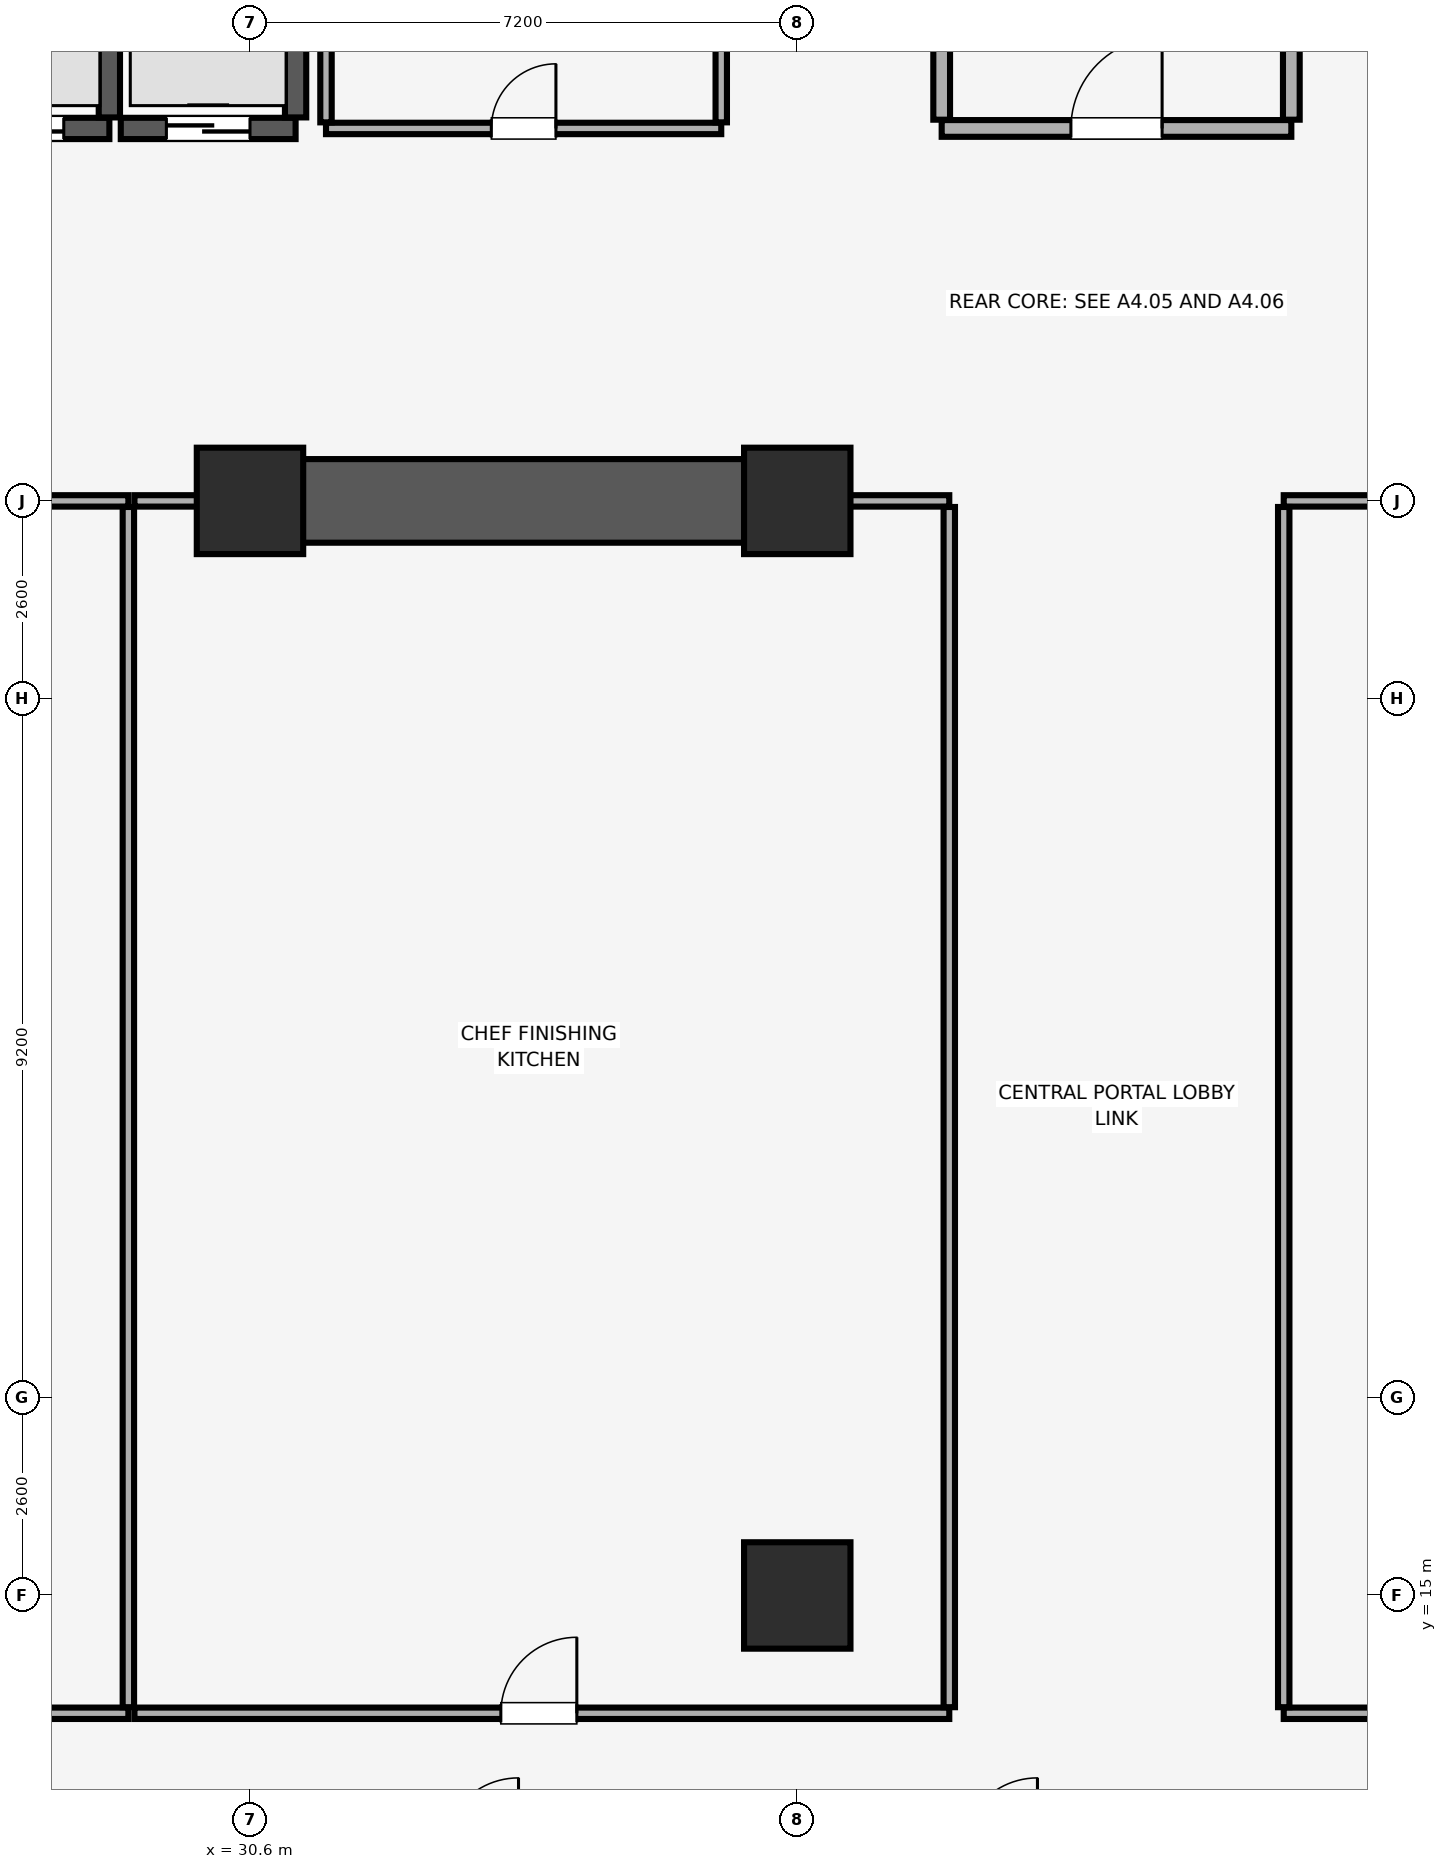
"""IFC4 building model, lengths in metres.
Left out: names, types, materials, properties, quantities, classifications, styles, units other than length and angle.
Written with IfcOpenShell. Run it as: python <this file> out.ifc"""

import sys

from ifc_helpers import new_model, si_unit, direction, frame, frame_2d, origin, origin_2d, place, context, subcontext, project, spatial, rectangle, extrude, element, fill, save


model = new_model("IFC4")
c1 = context("Model", 3, precision=1e-05, world=origin(), true_north=direction((0.0, 1.0)))
c2 = subcontext(c1, "Body", "Model", "MODEL_VIEW")
j1 = project(units=[si_unit("LENGTHUNIT", "METRE"), si_unit("PLANEANGLEUNIT", "RADIAN")], contexts=[c1])
p1 = place(None, origin())
s1 = spatial("IfcSite", under=j1, at=p1, CompositionType="ELEMENT")
p2 = place(p1, origin())
s2 = spatial("IfcBuilding", under=s1, at=p2, CompositionType="ELEMENT")
p3 = place(p2, frame((0.0, 0.0, 57.65)))
s3 = spatial("IfcBuildingStorey", under=s2, at=p3, CompositionType="ELEMENT", Elevation=57.65)
for number, where, z_axis, x_axis in (
    (1, (37.8, 15.0, 0.0), (0.0, 0.0, 1.0), (1.0, 0.0, 0.0)),
    (2, (30.6, 29.4, 0.0), (0.0, 0.0, 1.0), (1.0, 0.0, 0.0)),
    (3, (37.8, 29.4, 0.0), (0.0, 0.0, 1.0), (1.0, 0.0, 0.0)),
):
    element("IfcColumn", number, at=place(p3, frame(where, z_axis=z_axis, x_axis=x_axis)), inside=s3, PredefinedType="COLUMN", context=c2, shape_type="SweptSolid", body=[
        extrude(rectangle(XDim=1.4, YDim=1.4, at=origin_2d()), origin(), (0.0, 0.0, 1.0), 3.51),
    ])
p4 = place(p3, frame((30.4, 29.4, 0.0), z_axis=(0.0, 0.0, 1.0), x_axis=(1.0, 0.0, 0.0)))
e4 = element("IfcWall", 4, at=p4, inside=s3, PredefinedType="SHEAR", context=c2, shape_type="SweptSolid", body=[
    extrude(rectangle(XDim=7.6, YDim=1.1, at=frame_2d((3.8, 0.0))), origin(), (0.0, 0.0, 1.0), 3.51),
])
p5 = place(p3, frame((26.45, 34.3, 0.0), z_axis=(0.0, 0.0, 1.0), x_axis=(1.0, 0.0, 0.0)))
e5 = element("IfcWall", 5, at=p5, inside=s3, PredefinedType="SHEAR", context=c2, shape_type="SweptSolid", body=[
    extrude(rectangle(XDim=2.3, YDim=0.28, at=frame_2d((1.15, 0.0))), origin(), (0.0, 0.0, 1.0), 3.51),
])
p6 = place(p5, frame((0.6, 0.0, 0.0)))
e6 = element("IfcOpeningElement", 6, at=p6, cuts=e5, PredefinedType="OPENING", context=c2, shape_type="SweptSolid", body=[
    extrude(rectangle(XDim=1.1, YDim=2.2, at=frame_2d((0.55, 1.1))), frame((0.0, 0.15, 0.0), z_axis=(0.0, -1.0, 0.0), x_axis=(1.0, 0.0, 0.0)), (0.0, 0.0, 1.0), 0.3),
])
p7 = place(p3, frame((28.75, 34.445, 0.0), z_axis=(0.0, 0.0, 1.0), x_axis=(0.0, 1.0, 0.0)))
e7 = element("IfcWall", 7, at=p7, inside=s3, PredefinedType="SHEAR", context=c2, shape_type="SweptSolid", body=[
    extrude(rectangle(XDim=2.01, YDim=0.28, at=frame_2d((1.005, 0.0))), origin(), (0.0, 0.0, 1.0), 3.51),
])
p8 = place(p3, frame((28.9, 34.3, 0.0), z_axis=(0.0, 0.0, 1.0), x_axis=(1.0, 0.0, 0.0)))
e8 = element("IfcWall", 8, at=p8, inside=s3, PredefinedType="SHEAR", context=c2, shape_type="SweptSolid", body=[
    extrude(rectangle(XDim=2.3, YDim=0.28, at=frame_2d((1.15, 0.0))), origin(), (0.0, 0.0, 1.0), 3.51),
])
p9 = place(p8, frame((0.6, 0.0, 0.0)))
e9 = element("IfcOpeningElement", 9, at=p9, cuts=e8, PredefinedType="OPENING", context=c2, shape_type="SweptSolid", body=[
    extrude(rectangle(XDim=1.1, YDim=2.2, at=frame_2d((0.55, 1.1))), frame((0.0, 0.15, 0.0), z_axis=(0.0, -1.0, 0.0), x_axis=(1.0, 0.0, 0.0)), (0.0, 0.0, 1.0), 0.3),
])
p10 = place(p3, frame((31.2, 34.445, 0.0), z_axis=(0.0, 0.0, 1.0), x_axis=(0.0, 1.0, 0.0)))
e10 = element("IfcWall", 10, at=p10, inside=s3, PredefinedType="SHEAR", context=c2, shape_type="SweptSolid", body=[
    extrude(rectangle(XDim=2.01, YDim=0.28, at=frame_2d((1.005, 0.0))), origin(), (0.0, 0.0, 1.0), 3.51),
])
p11 = place(p3, frame((39.7, 34.3, 0.0), z_axis=(0.0, 0.0, 1.0), x_axis=(1.0, 0.0, 0.0)))
e11 = element("IfcWall", 11, at=p11, inside=s3, PredefinedType="PARTITIONING", context=c2, shape_type="SweptSolid", body=[
    extrude(rectangle(XDim=4.6, YDim=0.22, at=frame_2d((2.3, 0.0))), origin(), (0.0, 0.0, 1.0), 3.51),
])
p12 = place(p11, frame((1.7, 0.0, 0.0)))
e12 = element("IfcOpeningElement", 12, at=p12, cuts=e11, PredefinedType="OPENING", context=c2, shape_type="SweptSolid", body=[
    extrude(rectangle(XDim=1.2, YDim=2.15, at=frame_2d((0.6, 1.075))), frame((0.0, 0.12, 0.0), z_axis=(0.0, -1.0, 0.0), x_axis=(1.0, 0.0, 0.0)), (0.0, 0.0, 1.0), 0.24),
])
for number, where, z_axis, x_axis in (
    (13, (39.7, 34.415, 0.0), (0.0, 0.0, 1.0), (0.0, 1.0, 0.0)),
    (14, (44.3, 34.415, 0.0), (0.0, 0.0, 1.0), (0.0, 1.0, 0.0)),
):
    element("IfcWall", number, at=place(p3, frame(where, z_axis=z_axis, x_axis=x_axis)), inside=s3, PredefinedType="PARTITIONING", context=c2, shape_type="SweptSolid", body=[
        extrude(rectangle(XDim=5.785, YDim=0.22, at=frame_2d((2.893, 0.0))), origin(), (0.0, 0.0, 1.0), 3.51),
    ])
p13 = place(p3, frame((31.6, 34.3, 0.0), z_axis=(0.0, 0.0, 1.0), x_axis=(1.0, 0.0, 0.0)))
e15 = element("IfcWall", 15, at=p13, inside=s3, PredefinedType="PARTITIONING", context=c2, shape_type="SweptSolid", body=[
    extrude(rectangle(XDim=5.2, YDim=0.15, at=frame_2d((2.6, 0.0))), origin(), (0.0, 0.0, 1.0), 3.51),
])
p14 = place(p13, frame((2.175, 0.0, 0.0)))
e16 = element("IfcOpeningElement", 16, at=p14, cuts=e15, PredefinedType="OPENING", context=c2, shape_type="SweptSolid", body=[
    extrude(rectangle(XDim=0.85, YDim=2.1, at=frame_2d((0.425, 1.05))), frame((0.0, 0.085, 0.0), z_axis=(0.0, -1.0, 0.0), x_axis=(1.0, 0.0, 0.0)), (0.0, 0.0, 1.0), 0.17),
])
for number, where, z_axis, x_axis in (
    (17, (31.6, 34.38, 0.0), (0.0, 0.0, 1.0), (0.0, 1.0, 0.0)),
    (18, (36.8, 34.38, 0.0), (0.0, 0.0, 1.0), (0.0, 1.0, 0.0)),
):
    element("IfcWall", number, at=place(p3, frame(where, z_axis=z_axis, x_axis=x_axis)), inside=s3, PredefinedType="PARTITIONING", context=c2, shape_type="SweptSolid", body=[
        extrude(rectangle(XDim=4.94, YDim=0.15, at=frame_2d((2.47, 0.0))), origin(), (0.0, 0.0, 1.0), 3.51),
    ])
p15 = place(p3, frame((15.8, 13.45, 0.0), z_axis=(0.0, 0.0, 1.0), x_axis=(1.0, 0.0, 0.0)))
e19 = element("IfcWall", 19, at=p15, inside=s3, PredefinedType="PARTITIONING", context=c2, shape_type="SweptSolid", body=[
    extrude(rectangle(XDim=13.2, YDim=0.15, at=frame_2d((6.6, 0.0))), origin(), (0.0, 0.0, 1.0), 3.51),
])
p16 = place(p15, frame((5.35, 0.0, 0.0)))
e20 = element("IfcOpeningElement", 20, at=p16, cuts=e19, PredefinedType="OPENING", context=c2, shape_type="SweptSolid", body=[
    extrude(rectangle(XDim=1.5, YDim=2.25, at=frame_2d((0.75, 1.125))), frame((0.0, 0.085, 0.0), z_axis=(0.0, -1.0, 0.0), x_axis=(1.0, 0.0, 0.0)), (0.0, 0.0, 1.0), 0.17),
])
p17 = place(p3, frame((23.61, 29.4, 0.0), z_axis=(0.0, 0.0, 1.0), x_axis=(1.0, 0.0, 0.0)))
e21 = element("IfcWall", 21, at=p17, inside=s3, PredefinedType="PARTITIONING", context=c2, shape_type="SweptSolid", body=[
    extrude(rectangle(XDim=5.39, YDim=0.15, at=frame_2d((2.695, 0.0))), origin(), (0.0, 0.0, 1.0), 2.41),
])
p18 = place(p3, frame((29.0, 13.53, 0.0), z_axis=(0.0, 0.0, 1.0), x_axis=(0.0, 1.0, 0.0)))
e22 = element("IfcWall", 22, at=p18, inside=s3, PredefinedType="PARTITIONING", context=c2, shape_type="SweptSolid", body=[
    extrude(rectangle(XDim=15.79, YDim=0.15, at=frame_2d((7.895, 0.0))), origin(), (0.0, 0.0, 1.0), 3.51),
])
p19 = place(p3, frame((29.08, 13.45, 0.0), z_axis=(0.0, 0.0, 1.0), x_axis=(1.0, 0.0, 0.0)))
e23 = element("IfcWall", 23, at=p19, inside=s3, PredefinedType="PARTITIONING", context=c2, shape_type="SweptSolid", body=[
    extrude(rectangle(XDim=10.72, YDim=0.15, at=frame_2d((5.36, 0.0))), origin(), (0.0, 0.0, 1.0), 3.51),
])
p20 = place(p19, frame((4.82, 0.0, 0.0)))
e24 = element("IfcOpeningElement", 24, at=p20, cuts=e23, PredefinedType="OPENING", context=c2, shape_type="SweptSolid", body=[
    extrude(rectangle(XDim=1.0, YDim=2.15, at=frame_2d((0.5, 1.075))), frame((0.0, 0.085, 0.0), z_axis=(0.0, -1.0, 0.0), x_axis=(1.0, 0.0, 0.0)), (0.0, 0.0, 1.0), 0.17),
])
p21 = place(p3, frame((29.08, 29.4, 0.0), z_axis=(0.0, 0.0, 1.0), x_axis=(1.0, 0.0, 0.0)))
e25 = element("IfcWall", 25, at=p21, inside=s3, PredefinedType="PARTITIONING", context=c2, shape_type="SweptSolid", body=[
    extrude(rectangle(XDim=1.31, YDim=0.15, at=frame_2d((0.655, 0.0))), origin(), (0.0, 0.0, 1.0), 2.41),
])
p22 = place(p3, frame((38.01, 29.4, 0.0), z_axis=(0.0, 0.0, 1.0), x_axis=(1.0, 0.0, 0.0)))
e26 = element("IfcWall", 26, at=p22, inside=s3, PredefinedType="PARTITIONING", context=c2, shape_type="SweptSolid", body=[
    extrude(rectangle(XDim=1.79, YDim=0.15, at=frame_2d((0.895, 0.0))), origin(), (0.0, 0.0, 1.0), 2.41),
])
p23 = place(p3, frame((39.8, 13.53, 0.0), z_axis=(0.0, 0.0, 1.0), x_axis=(0.0, 1.0, 0.0)))
e27 = element("IfcWall", 27, at=p23, inside=s3, PredefinedType="PARTITIONING", context=c2, shape_type="SweptSolid", body=[
    extrude(rectangle(XDim=15.79, YDim=0.15, at=frame_2d((7.895, 0.0))), origin(), (0.0, 0.0, 1.0), 3.51),
])
p24 = place(p3, frame((44.2, 13.45, 0.0), z_axis=(0.0, 0.0, 1.0), x_axis=(1.0, 0.0, 0.0)))
e28 = element("IfcWall", 28, at=p24, inside=s3, PredefinedType="PARTITIONING", context=c2, shape_type="SweptSolid", body=[
    extrude(rectangle(XDim=13.6, YDim=0.15, at=frame_2d((6.8, 0.0))), origin(), (0.0, 0.0, 1.0), 3.51),
])
p25 = place(p24, frame((6.05, 0.0, 0.0)))
e29 = element("IfcOpeningElement", 29, at=p25, cuts=e28, PredefinedType="OPENING", context=c2, shape_type="SweptSolid", body=[
    extrude(rectangle(XDim=1.5, YDim=2.25, at=frame_2d((0.75, 1.125))), frame((0.0, 0.085, 0.0), z_axis=(0.0, -1.0, 0.0), x_axis=(1.0, 0.0, 0.0)), (0.0, 0.0, 1.0), 0.17),
])
p26 = place(p3, frame((44.2, 29.4, 0.0), z_axis=(0.0, 0.0, 1.0), x_axis=(1.0, 0.0, 0.0)))
e30 = element("IfcWall", 30, at=p26, inside=s3, PredefinedType="PARTITIONING", context=c2, shape_type="SweptSolid", body=[
    extrude(rectangle(XDim=1.79, YDim=0.15, at=frame_2d((0.895, 0.0))), origin(), (0.0, 0.0, 1.0), 2.41),
])
p27 = place(p3, frame((44.2, 13.53, 0.0), z_axis=(0.0, 0.0, 1.0), x_axis=(0.0, 1.0, 0.0)))
e31 = element("IfcWall", 31, at=p27, inside=s3, PredefinedType="PARTITIONING", context=c2, shape_type="SweptSolid", body=[
    extrude(rectangle(XDim=15.79, YDim=0.15, at=frame_2d((7.895, 0.0))), origin(), (0.0, 0.0, 1.0), 3.51),
])
p28 = place(p6, origin())
e32 = element("IfcDoor", 32, at=p28, inside=s3, OperationType="DOUBLE_DOOR_SLIDING", PredefinedType="DOOR", context=c2, shape_type="SweptSolid", body=[
    extrude(rectangle(XDim=1.1, YDim=2.2, at=frame_2d((0.55, 1.1))), frame((0.0, 0.025, 0.0), z_axis=(0.0, -1.0, 0.0), x_axis=(1.0, 0.0, 0.0)), (0.0, 0.0, 1.0), 0.05),
])
fill(e6, e32)
p29 = place(p9, origin())
e33 = element("IfcDoor", 33, at=p29, inside=s3, OperationType="DOUBLE_DOOR_SLIDING", PredefinedType="DOOR", context=c2, shape_type="SweptSolid", body=[
    extrude(rectangle(XDim=1.1, YDim=2.2, at=frame_2d((0.55, 1.1))), frame((0.0, 0.025, 0.0), z_axis=(0.0, -1.0, 0.0), x_axis=(1.0, 0.0, 0.0)), (0.0, 0.0, 1.0), 0.05),
])
fill(e9, e33)
p30 = place(p12, origin())
e34 = element("IfcDoor", 34, at=p30, inside=s3, OperationType="SINGLE_SWING_RIGHT", PredefinedType="DOOR", context=c2, shape_type="SweptSolid", body=[
    extrude(rectangle(XDim=1.2, YDim=2.15, at=frame_2d((0.6, 1.075))), frame((0.0, 0.025, 0.0), z_axis=(0.0, -1.0, 0.0), x_axis=(1.0, 0.0, 0.0)), (0.0, 0.0, 1.0), 0.05),
])
fill(e12, e34)
p31 = place(p14, origin())
e35 = element("IfcDoor", 35, at=p31, inside=s3, OperationType="SINGLE_SWING_RIGHT", PredefinedType="DOOR", context=c2, shape_type="SweptSolid", body=[
    extrude(rectangle(XDim=0.85, YDim=2.1, at=frame_2d((0.425, 1.05))), frame((0.0, 0.025, 0.0), z_axis=(0.0, -1.0, 0.0), x_axis=(1.0, 0.0, 0.0)), (0.0, 0.0, 1.0), 0.05),
])
fill(e16, e35)
p32 = place(p20, origin())
e36 = element("IfcDoor", 36, at=p32, inside=s3, OperationType="SINGLE_SWING_RIGHT", PredefinedType="DOOR", context=c2, shape_type="SweptSolid", body=[
    extrude(rectangle(XDim=1.0, YDim=2.15, at=frame_2d((0.5, 1.075))), frame((0.0, 0.025, 0.0), z_axis=(0.0, -1.0, 0.0), x_axis=(1.0, 0.0, 0.0)), (0.0, 0.0, 1.0), 0.05),
])
fill(e24, e36)
save(model, sys.argv[1])
